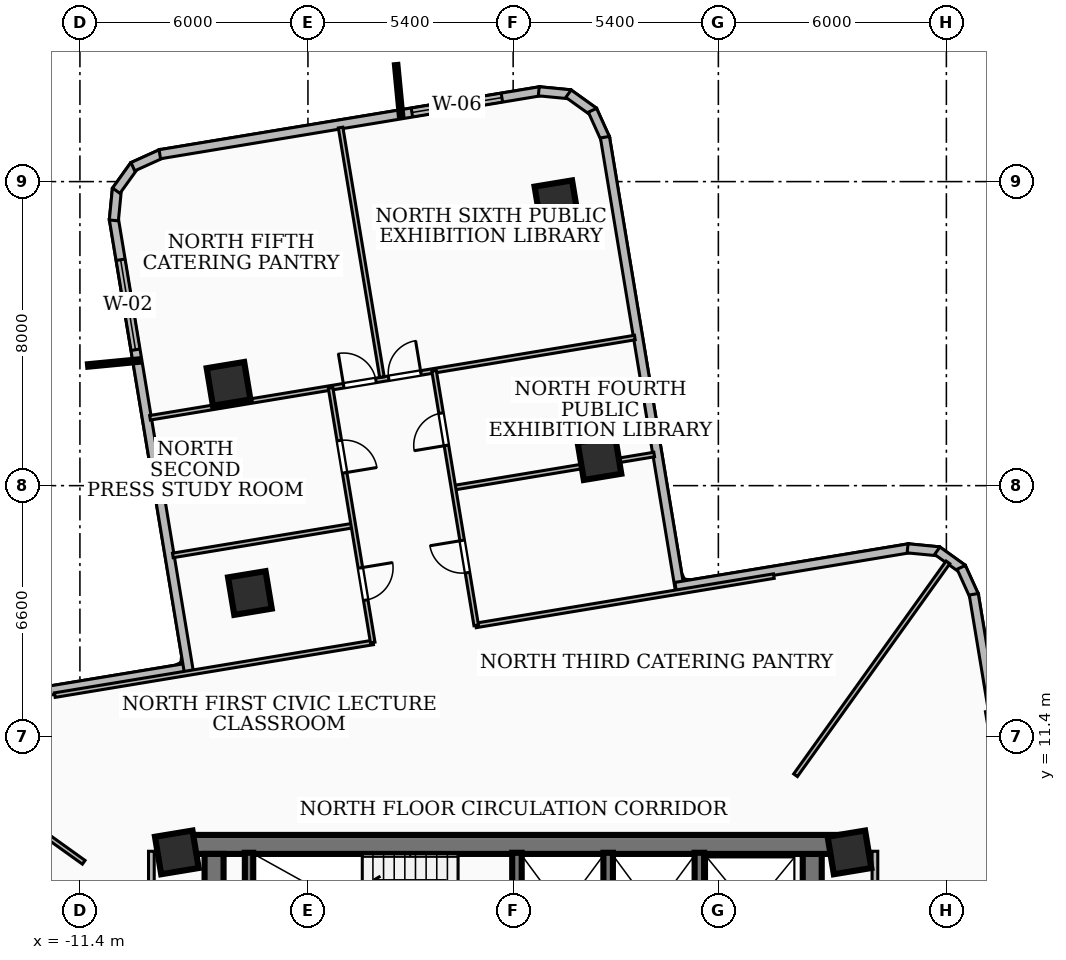
"""IFC4 building model, lengths in metres.
Left out: names, types, materials, properties, quantities, classifications, styles, units other than length and angle.
Written with IfcOpenShell. Run it as: python <this file> out.ifc"""

import sys

from ifc_helpers import new_model, si_unit, direction, frame, frame_2d, origin, origin_2d, place, context, subcontext, project, spatial, rectangle, extrude, element, fill, save


model = new_model("IFC4")
c1 = context("Model", 3, precision=1e-05, world=origin(), true_north=direction((0.0, 1.0)))
c2 = subcontext(c1, "Body", "Model", "MODEL_VIEW")
j1 = project(units=[si_unit("LENGTHUNIT", "METRE"), si_unit("PLANEANGLEUNIT", "RADIAN")], contexts=[c1])
p1 = place(None, origin())
s1 = spatial("IfcSite", under=j1, at=p1, CompositionType="ELEMENT")
p2 = place(p1, origin())
s2 = spatial("IfcBuilding", under=s1, at=p2, CompositionType="ELEMENT")
p3 = place(p2, frame((0.0, 0.0, 92.88)))
s3 = spatial("IfcBuildingStorey", under=s2, at=p3, CompositionType="ELEMENT", Elevation=92.88)
p4 = place(p3, frame((-8.78, 8.56, 0.0), z_axis=(0.0, 0.0, 1.0), x_axis=(1.0, 0.0, 0.0)))
e1 = element("IfcWall", 1, at=p4, inside=s3, PredefinedType="SHEAR", context=c2, shape_type="SweptSolid", body=[
    extrude(rectangle(XDim=17.56, YDim=0.5, at=frame_2d((8.78, 0.0))), origin(), (0.0, 0.0, 1.0), 3.34),
])
for number, where, z_axis, x_axis in (
    (2, (-7.87, 2.0, 0.0), (0.0, 0.0, 1.0), (0.0, 1.0, 0.0)),
    (3, (7.87, 8.31, 0.0), (0.0, 0.0, 1.0), (0.0, -1.0, 0.0)),
):
    element("IfcWall", number, at=place(p3, frame(where, z_axis=z_axis, x_axis=x_axis)), inside=s3, PredefinedType="SHEAR", context=c2, shape_type="SweptSolid", body=[
        extrude(rectangle(XDim=6.31, YDim=0.5, at=frame_2d((3.155, 0.0))), origin(), (0.0, 0.0, 1.0), 3.34),
    ])
p5 = place(p3, frame((-6.95, 5.28, 0.0), z_axis=(0.0, 0.0, 1.0), x_axis=(0.0, 1.0, 0.0)))
e4 = element("IfcWall", 4, at=p5, inside=s3, PredefinedType="SOLIDWALL", context=c2, shape_type="SweptSolid", body=[
    extrude(rectangle(XDim=3.06, YDim=0.22, at=frame_2d((1.53, 0.0))), origin(), (0.0, 0.0, 1.0), 3.34),
])
for number, where, z_axis, x_axis in (
    (5, (0.1, 5.3, 0.0), (0.0, 0.0, 1.0), (0.0, 1.0, 0.0)),
    (6, (2.5, 5.3, 0.0), (0.0, 0.0, 1.0), (0.0, 1.0, 0.0)),
    (7, (4.9, 5.3, 0.0), (0.0, 0.0, 1.0), (0.0, 1.0, 0.0)),
):
    element("IfcWall", number, at=place(p3, frame(where, z_axis=z_axis, x_axis=x_axis)), inside=s3, PredefinedType="SOLIDWALL", context=c2, shape_type="SweptSolid", body=[
        extrude(rectangle(XDim=3.04, YDim=0.25, at=frame_2d((1.52, 0.0))), origin(), (0.0, 0.0, 1.0), 3.34),
    ])
for number, where, z_axis, x_axis in (
    (8, (-8.85, 8.35, 0.0), (0.0, 0.0, 1.0), (0.987, 0.163, 0.0)),
    (9, (8.85, 8.35, 0.0), (0.0, 0.0, 1.0), (0.987, 0.163, 0.0)),
    (10, (2.271, 18.724, 0.0), (0.0, 0.0, 1.0), (0.987, 0.163, 0.0)),
    (11, (-6.927, 15.175, 0.0), (0.0, 0.0, 1.0), (0.987, 0.163, 0.0)),
    (12, (1.139, 25.457, 0.0), (0.0, 0.0, 1.0), (0.987, 0.163, 0.0)),
    (13, (-7.489, 20.679, 0.0), (0.0, 0.0, 1.0), (0.987, 0.163, 0.0)),
):
    element("IfcColumn", number, at=place(p3, frame(where, z_axis=z_axis, x_axis=x_axis)), inside=s3, PredefinedType="COLUMN", context=c2, shape_type="SweptSolid", body=[
        extrude(rectangle(XDim=1.0, YDim=1.0, at=origin_2d()), origin(), (0.0, 0.0, 1.0), 3.6),
    ])
p6 = place(p3, frame((-15.142, 12.12, 0.0), z_axis=(0.0, 0.0, 1.0), x_axis=(0.986586085056, 0.163241835244, 0.0)))
e14 = element("IfcWall", 14, at=p6, inside=s3, PredefinedType="SOLIDWALL", context=c2, shape_type="SweptSolid", body=[
    extrude(rectangle(XDim=6.775, YDim=0.24, at=frame_2d((3.387, 0.0))), origin(), (0.0, 0.0, 1.0), 3.34),
])
p7 = place(p3, frame((-8.537, 13.115, 0.0), z_axis=(0.0, 0.0, 1.0), x_axis=(-0.163290786455, 0.986577984276, 0.0)))
e15 = element("IfcWall", 15, at=p7, inside=s3, PredefinedType="SOLIDWALL", context=c2, shape_type="SweptSolid", body=[
    extrude(rectangle(XDim=12.076, YDim=0.24, at=frame_2d((6.038, 0.0))), origin(), (0.0, 0.0, 1.0), 3.34),
])
p8 = place(p7, frame((8.576, 0.0, 0.85)))
e16 = element("IfcOpeningElement", 16, at=p8, cuts=e15, PredefinedType="OPENING", context=c2, shape_type="SweptSolid", body=[
    extrude(rectangle(XDim=2.4, YDim=2.1, at=frame_2d((1.2, 1.05))), frame((0.0, 0.13, 0.0), z_axis=(0.0, -1.0, 0.0), x_axis=(1.0, 0.0, 0.0)), (0.0, 0.0, 1.0), 0.26),
])
p9 = place(p3, frame((-10.507, 24.979, 0.0), z_axis=(0.0, 0.0, 1.0), x_axis=(0.096389937095, 0.995343649212, 0.0)))
e17 = element("IfcWall", 17, at=p9, inside=s3, PredefinedType="SOLIDWALL", context=c2, shape_type="SweptSolid", body=[
    extrude(rectangle(XDim=0.831, YDim=0.24, at=frame_2d((0.416, 0.0))), origin(), (0.0, 0.0, 1.0), 3.34),
])
p10 = place(p3, frame((-10.444, 25.761, 0.0), z_axis=(0.0, 0.0, 1.0), x_axis=(0.583561896965, 0.812068662375, 0.0)))
e18 = element("IfcWall", 18, at=p10, inside=s3, PredefinedType="SOLIDWALL", context=c2, shape_type="SweptSolid", body=[
    extrude(rectangle(XDim=0.814, YDim=0.24, at=frame_2d((0.407, 0.0))), origin(), (0.0, 0.0, 1.0), 3.34),
])
p11 = place(p3, frame((-10.007, 26.392, 0.0), z_axis=(0.0, 0.0, 1.0), x_axis=(0.91142038271, 0.41147647075, 0.0)))
e19 = element("IfcWall", 19, at=p11, inside=s3, PredefinedType="SOLIDWALL", context=c2, shape_type="SweptSolid", body=[
    extrude(rectangle(XDim=0.831, YDim=0.24, at=frame_2d((0.415, 0.0))), origin(), (0.0, 0.0, 1.0), 3.34),
])
p12 = place(p3, frame((-9.298, 26.72, 0.0), z_axis=(0.0, 0.0, 1.0), x_axis=(0.98657583628, 0.163303763794, 0.0)))
e20 = element("IfcWall", 20, at=p12, inside=s3, PredefinedType="SOLIDWALL", context=c2, shape_type="SweptSolid", body=[
    extrude(rectangle(XDim=10.159, YDim=0.24, at=frame_2d((5.079, 0.0))), origin(), (0.0, 0.0, 1.0), 3.34),
])
p13 = place(p12, frame((6.724, 0.0, 0.85)))
e21 = element("IfcOpeningElement", 21, at=p13, cuts=e20, PredefinedType="OPENING", context=c2, shape_type="SweptSolid", body=[
    extrude(rectangle(XDim=2.4, YDim=1.85, at=frame_2d((1.2, 0.925))), frame((0.0, 0.13, 0.0), z_axis=(0.0, -1.0, 0.0), x_axis=(1.0, 0.0, 0.0)), (0.0, 0.0, 1.0), 0.26),
])
p14 = place(p3, frame((0.674, 28.377, 0.0), z_axis=(0.0, 0.0, 1.0), x_axis=(0.99537180181, -0.096098783346, 0.0)))
e22 = element("IfcWall", 22, at=p14, inside=s3, PredefinedType="SOLIDWALL", context=c2, shape_type="SweptSolid", body=[
    extrude(rectangle(XDim=0.831, YDim=0.24, at=frame_2d((0.416, 0.0))), origin(), (0.0, 0.0, 1.0), 3.34),
])
p15 = place(p3, frame((1.456, 28.314, 0.0), z_axis=(0.0, 0.0, 1.0), x_axis=(0.812108665246, -0.583506226045, 0.0)))
e23 = element("IfcWall", 23, at=p15, inside=s3, PredefinedType="SOLIDWALL", context=c2, shape_type="SweptSolid", body=[
    extrude(rectangle(XDim=0.814, YDim=0.24, at=frame_2d((0.407, 0.0))), origin(), (0.0, 0.0, 1.0), 3.34),
])
p16 = place(p3, frame((2.087, 27.877, 0.0), z_axis=(0.0, 0.0, 1.0), x_axis=(0.412272558088, -0.91106055663, 0.0)))
e24 = element("IfcWall", 24, at=p16, inside=s3, PredefinedType="SOLIDWALL", context=c2, shape_type="SweptSolid", body=[
    extrude(rectangle(XDim=0.83, YDim=0.24, at=frame_2d((0.415, 0.0))), origin(), (0.0, 0.0, 1.0), 3.34),
])
p17 = place(p3, frame((2.415, 27.169, 0.0), z_axis=(0.0, 0.0, 1.0), x_axis=(0.163307072567, -0.986575288587, 0.0)))
e25 = element("IfcWall", 25, at=p17, inside=s3, PredefinedType="SOLIDWALL", context=c2, shape_type="SweptSolid", body=[
    extrude(rectangle(XDim=12.075, YDim=0.24, at=frame_2d((6.038, 0.0))), origin(), (0.0, 0.0, 1.0), 2.486),
])
p18 = place(p3, frame((4.276, 15.335, 0.0), z_axis=(0.0, 0.0, 1.0), x_axis=(0.986586851863, 0.16323720082, 0.0)))
e26 = element("IfcWall", 26, at=p18, inside=s3, PredefinedType="SOLIDWALL", context=c2, shape_type="SweptSolid", body=[
    extrude(rectangle(XDim=6.237, YDim=0.24, at=frame_2d((3.118, 0.0))), origin(), (0.0, 0.0, 1.0), 2.486),
])
p19 = place(p3, frame((10.379, 16.351, 0.0), z_axis=(0.0, 0.0, 1.0), x_axis=(0.995335447313, -0.096474594184, 0.0)))
e27 = element("IfcWall", 27, at=p19, inside=s3, PredefinedType="SOLIDWALL", context=c2, shape_type="SweptSolid", body=[
    extrude(rectangle(XDim=0.83, YDim=0.24, at=frame_2d((0.415, 0.0))), origin(), (0.0, 0.0, 1.0), 3.34),
])
p20 = place(p3, frame((11.16, 16.288, 0.0), z_axis=(0.0, 0.0, 1.0), x_axis=(0.812068662375, -0.583561896965, 0.0)))
e28 = element("IfcWall", 28, at=p20, inside=s3, PredefinedType="SOLIDWALL", context=c2, shape_type="SweptSolid", body=[
    extrude(rectangle(XDim=0.814, YDim=0.24, at=frame_2d((0.407, 0.0))), origin(), (0.0, 0.0, 1.0), 3.34),
])
p21 = place(p3, frame((11.791, 15.851, 0.0), z_axis=(0.0, 0.0, 1.0), x_axis=(0.412696106872, -0.910868773958, 0.0)))
e29 = element("IfcWall", 29, at=p21, inside=s3, PredefinedType="SOLIDWALL", context=c2, shape_type="SweptSolid", body=[
    extrude(rectangle(XDim=0.831, YDim=0.24, at=frame_2d((0.416, 0.0))), origin(), (0.0, 0.0, 1.0), 3.34),
])
p22 = place(p3, frame((12.12, 15.142, 0.0), z_axis=(0.0, 0.0, 1.0), x_axis=(0.163241835244, -0.986586085056, 0.0)))
e30 = element("IfcWall", 30, at=p22, inside=s3, PredefinedType="SOLIDWALL", context=c2, shape_type="SweptSolid", body=[
    extrude(rectangle(XDim=6.775, YDim=0.24, at=frame_2d((3.387, 0.0))), origin(), (0.0, 0.0, 1.0), 2.644),
])
for number, where, z_axis, x_axis in (
    (31, (-9.52, 1.75, 0.0), (0.0, 0.0, 1.0), (0.0, 1.0, 0.0)),
    (32, (9.52, 1.75, 0.0), (0.0, 0.0, 1.0), (0.0, 1.0, 0.0)),
):
    element("IfcWall", number, at=place(p3, frame(where, z_axis=z_axis, x_axis=x_axis)), inside=s3, PredefinedType="PARTITIONING", context=c2, shape_type="SweptSolid", body=[
        extrude(rectangle(XDim=6.63, YDim=0.15, at=frame_2d((3.315, 0.0))), origin(), (0.0, 0.0, 1.0), 2.486),
    ])
p23 = place(p3, frame((7.431, 10.38, 0.0), z_axis=(0.0, 0.0, 1.0), x_axis=(0.582126278944, 0.813098392178, 0.0)))
e33 = element("IfcWall", 33, at=p23, inside=s3, PredefinedType="PARTITIONING", context=c2, shape_type="SweptSolid", body=[
    extrude(rectangle(XDim=6.889, YDim=0.12, at=frame_2d((3.444, 0.0))), origin(), (0.0, 0.0, 1.0), 2.486),
])
p24 = place(p3, frame((-11.3, 8.09, 0.0), z_axis=(0.0, 0.0, 1.0), x_axis=(-0.813131268368, 0.582080355623, 0.0)))
e34 = element("IfcWall", 34, at=p24, inside=s3, PredefinedType="PARTITIONING", context=c2, shape_type="SweptSolid", body=[
    extrude(rectangle(XDim=5.757, YDim=0.12, at=frame_2d((2.878, 0.0))), origin(), (0.0, 0.0, 1.0), 3.34),
])
p25 = place(p3, frame((-3.686, 13.874, 0.0), z_axis=(0.0, 0.0, 1.0), x_axis=(-0.98658138377, -0.163270245909, 0.0)))
e35 = element("IfcWall", 35, at=p25, inside=s3, PredefinedType="PARTITIONING", context=c2, shape_type="SweptSolid", body=[
    extrude(rectangle(XDim=8.489, YDim=0.12, at=frame_2d((4.245, 0.0))), origin(), (0.0, 0.0, 1.0), 2.486),
])
p26 = place(p3, frame((6.86, 15.62, 0.0), z_axis=(0.0, 0.0, 1.0), x_axis=(-0.986575116384, -0.16330811288, 0.0)))
e36 = element("IfcWall", 36, at=p26, inside=s3, PredefinedType="PARTITIONING", context=c2, shape_type="SweptSolid", body=[
    extrude(rectangle(XDim=7.949, YDim=0.12, at=frame_2d((3.974, 0.0))), origin(), (0.0, 0.0, 1.0), 2.486),
])
p27 = place(p3, frame((-4.225, 16.948, 0.0), z_axis=(0.0, 0.0, 1.0), x_axis=(-0.986542154764, -0.163507115668, 0.0)))
e37 = element("IfcWall", 37, at=p27, inside=s3, PredefinedType="PARTITIONING", context=c2, shape_type="SweptSolid", body=[
    extrude(rectangle(XDim=4.794, YDim=0.12, at=frame_2d((2.397, 0.0))), origin(), (0.0, 0.0, 1.0), 2.486),
])
p28 = place(p3, frame((3.711, 18.819, 0.0), z_axis=(0.0, 0.0, 1.0), x_axis=(-0.986548097851, -0.163471253213, 0.0)))
e38 = element("IfcWall", 38, at=p28, inside=s3, PredefinedType="PARTITIONING", context=c2, shape_type="SweptSolid", body=[
    extrude(rectangle(XDim=5.335, YDim=0.12, at=frame_2d((2.667, 0.0))), origin(), (0.0, 0.0, 1.0), 2.486),
])
p29 = place(p3, frame((-4.804, 20.572, 0.0), z_axis=(0.0, 0.0, 1.0), x_axis=(0.163308569386, -0.986575040818, 0.0)))
e39 = element("IfcWall", 39, at=p29, inside=s3, PredefinedType="PARTITIONING", context=c2, shape_type="SweptSolid", body=[
    extrude(rectangle(XDim=6.79, YDim=0.12, at=frame_2d((3.395, 0.0))), origin(), (0.0, 0.0, 1.0), 3.34),
])
p30 = place(p29, frame((4.8, 0.0, 0.0)))
e40 = element("IfcOpeningElement", 40, at=p30, cuts=e39, PredefinedType="OPENING", context=c2, shape_type="SweptSolid", body=[
    extrude(rectangle(XDim=0.86, YDim=2.04, at=frame_2d((0.43, 1.02))), frame((0.0, 0.07, 0.0), z_axis=(0.0, -1.0, 0.0), x_axis=(1.0, 0.0, 0.0)), (0.0, 0.0, 1.0), 0.14),
])
p31 = place(p29, frame((1.405, 0.0, 0.0)))
e41 = element("IfcOpeningElement", 41, at=p31, cuts=e39, PredefinedType="OPENING", context=c2, shape_type="SweptSolid", body=[
    extrude(rectangle(XDim=0.86, YDim=2.04, at=frame_2d((0.43, 1.02))), frame((0.0, 0.07, 0.0), z_axis=(0.0, -1.0, 0.0), x_axis=(1.0, 0.0, 0.0)), (0.0, 0.0, 1.0), 0.14),
])
p32 = place(p3, frame((-0.972, 14.324, 0.0), z_axis=(0.0, 0.0, 1.0), x_axis=(-0.163366745174, 0.98656540917, 0.0)))
e42 = element("IfcWall", 42, at=p32, inside=s3, PredefinedType="PARTITIONING", context=c2, shape_type="SweptSolid", body=[
    extrude(rectangle(XDim=6.789, YDim=0.12, at=frame_2d((3.395, 0.0))), origin(), (0.0, 0.0, 1.0), 3.34),
])
p33 = place(p32, frame((1.405, 0.0, 0.0)))
e43 = element("IfcOpeningElement", 43, at=p33, cuts=e42, PredefinedType="OPENING", context=c2, shape_type="SweptSolid", body=[
    extrude(rectangle(XDim=0.86, YDim=2.04, at=frame_2d((0.43, 1.02))), frame((0.0, 0.07, 0.0), z_axis=(0.0, -1.0, 0.0), x_axis=(1.0, 0.0, 0.0)), (0.0, 0.0, 1.0), 0.14),
])
p34 = place(p32, frame((4.8, 0.0, 0.0)))
e44 = element("IfcOpeningElement", 44, at=p34, cuts=e42, PredefinedType="OPENING", context=c2, shape_type="SweptSolid", body=[
    extrude(rectangle(XDim=0.86, YDim=2.04, at=frame_2d((0.43, 1.02))), frame((0.0, 0.07, 0.0), z_axis=(0.0, -1.0, 0.0), x_axis=(1.0, 0.0, 0.0)), (0.0, 0.0, 1.0), 0.14),
])
p35 = place(p3, frame((-3.453, 20.856, 0.0), z_axis=(0.0, 0.0, 1.0), x_axis=(-0.163346014225, 0.986568841813, 0.0)))
e45 = element("IfcWall", 45, at=p35, inside=s3, PredefinedType="PARTITIONING", context=c2, shape_type="SweptSolid", body=[
    extrude(rectangle(XDim=6.656, YDim=0.12, at=frame_2d((3.328, 0.0))), origin(), (0.0, 0.0, 1.0), 2.832),
])
p36 = place(p3, frame((-9.555, 19.786, 0.0), z_axis=(0.0, 0.0, 1.0), x_axis=(0.98658208559, 0.163266005016, 0.0)))
e46 = element("IfcWall", 46, at=p36, inside=s3, PredefinedType="PARTITIONING", context=c2, shape_type="SweptSolid", body=[
    extrude(rectangle(XDim=12.93, YDim=0.12, at=frame_2d((6.465, 0.0))), origin(), (0.0, 0.0, 1.0), 2.486),
])
p37 = place(p36, frame((6.365, 0.0, 0.0)))
e47 = element("IfcOpeningElement", 47, at=p37, cuts=e46, PredefinedType="OPENING", context=c2, shape_type="SweptSolid", body=[
    extrude(rectangle(XDim=0.86, YDim=2.04, at=frame_2d((0.43, 1.02))), frame((0.0, 0.07, 0.0), z_axis=(0.0, -1.0, 0.0), x_axis=(1.0, 0.0, 0.0)), (0.0, 0.0, 1.0), 0.14),
])
p38 = place(p36, frame((5.165, 0.0, 0.0)))
e48 = element("IfcOpeningElement", 48, at=p38, cuts=e46, PredefinedType="OPENING", context=c2, shape_type="SweptSolid", body=[
    extrude(rectangle(XDim=0.86, YDim=2.04, at=frame_2d((0.43, 1.02))), frame((0.0, 0.07, 0.0), z_axis=(0.0, -1.0, 0.0), x_axis=(1.0, 0.0, 0.0)), (0.0, 0.0, 1.0), 0.14),
])
p39 = place(p8, origin())
e49 = element("IfcWindow", 49, at=p39, inside=s3, PartitioningType="SINGLE_PANEL", PredefinedType="WINDOW", context=c2, shape_type="SweptSolid", body=[
    extrude(rectangle(XDim=2.4, YDim=2.1, at=frame_2d((1.2, 1.05))), frame((0.0, 0.03, 0.0), z_axis=(0.0, -1.0, 0.0), x_axis=(1.0, 0.0, 0.0)), (0.0, 0.0, 1.0), 0.06),
])
fill(e16, e49)
p40 = place(p13, origin())
e50 = element("IfcWindow", 50, at=p40, inside=s3, PartitioningType="SINGLE_PANEL", PredefinedType="WINDOW", context=c2, shape_type="SweptSolid", body=[
    extrude(rectangle(XDim=2.4, YDim=1.85, at=frame_2d((1.2, 0.925))), frame((0.0, 0.03, 0.0), z_axis=(0.0, -1.0, 0.0), x_axis=(1.0, 0.0, 0.0)), (0.0, 0.0, 1.0), 0.06),
])
fill(e21, e50)
p41 = place(p30, origin())
e51 = element("IfcDoor", 51, at=p41, inside=s3, OperationType="SINGLE_SWING_LEFT", PredefinedType="DOOR", context=c2, shape_type="SweptSolid", body=[
    extrude(rectangle(XDim=0.86, YDim=2.04, at=frame_2d((0.43, 1.02))), frame((0.0, 0.025, 0.0), z_axis=(0.0, -1.0, 0.0), x_axis=(1.0, 0.0, 0.0)), (0.0, 0.0, 1.0), 0.05),
])
fill(e40, e51)
p42 = place(p31, origin())
e52 = element("IfcDoor", 52, at=p42, inside=s3, OperationType="SINGLE_SWING_RIGHT", PredefinedType="DOOR", context=c2, shape_type="SweptSolid", body=[
    extrude(rectangle(XDim=0.86, YDim=2.04, at=frame_2d((0.43, 1.02))), frame((0.0, 0.025, 0.0), z_axis=(0.0, -1.0, 0.0), x_axis=(1.0, 0.0, 0.0)), (0.0, 0.0, 1.0), 0.05),
])
fill(e41, e52)
p43 = place(p33, origin())
e53 = element("IfcDoor", 53, at=p43, inside=s3, OperationType="SINGLE_SWING_RIGHT", PredefinedType="DOOR", context=c2, shape_type="SweptSolid", body=[
    extrude(rectangle(XDim=0.86, YDim=2.04, at=frame_2d((0.43, 1.02))), frame((0.0, 0.025, 0.0), z_axis=(0.0, -1.0, 0.0), x_axis=(1.0, 0.0, 0.0)), (0.0, 0.0, 1.0), 0.05),
])
fill(e43, e53)
p44 = place(p34, origin())
e54 = element("IfcDoor", 54, at=p44, inside=s3, OperationType="SINGLE_SWING_LEFT", PredefinedType="DOOR", context=c2, shape_type="SweptSolid", body=[
    extrude(rectangle(XDim=0.86, YDim=2.04, at=frame_2d((0.43, 1.02))), frame((0.0, 0.025, 0.0), z_axis=(0.0, -1.0, 0.0), x_axis=(1.0, 0.0, 0.0)), (0.0, 0.0, 1.0), 0.05),
])
fill(e44, e54)
p45 = place(p37, origin())
e55 = element("IfcDoor", 55, at=p45, inside=s3, OperationType="SINGLE_SWING_RIGHT", PredefinedType="DOOR", context=c2, shape_type="SweptSolid", body=[
    extrude(rectangle(XDim=0.86, YDim=2.04, at=frame_2d((0.43, 1.02))), frame((0.0, 0.025, 0.0), z_axis=(0.0, -1.0, 0.0), x_axis=(1.0, 0.0, 0.0)), (0.0, 0.0, 1.0), 0.05),
])
fill(e47, e55)
p46 = place(p38, origin())
e56 = element("IfcDoor", 56, at=p46, inside=s3, OperationType="SINGLE_SWING_LEFT", PredefinedType="DOOR", context=c2, shape_type="SweptSolid", body=[
    extrude(rectangle(XDim=0.86, YDim=2.04, at=frame_2d((0.43, 1.02))), frame((0.0, 0.025, 0.0), z_axis=(0.0, -1.0, 0.0), x_axis=(1.0, 0.0, 0.0)), (0.0, 0.0, 1.0), 0.05),
])
fill(e48, e56)
save(model, sys.argv[1])
